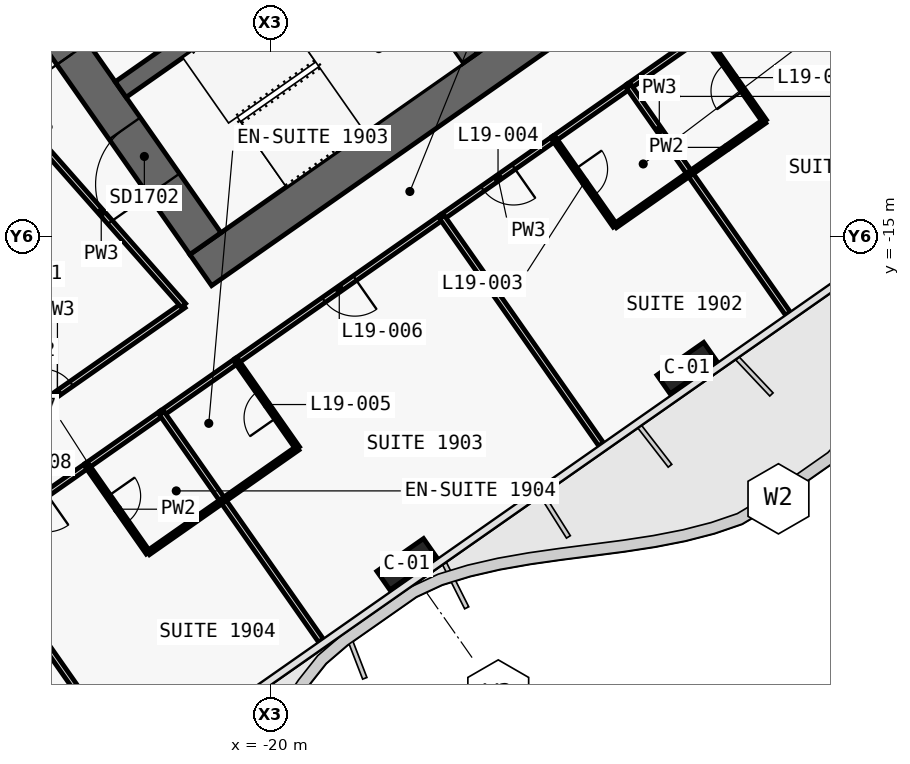
"""IFC4 building model, lengths in metres.
Left out: names, types, materials, properties, quantities, classifications, styles, units other than length and angle.
Written with IfcOpenShell. Run it as: python <this file> out.ifc"""

import sys

from ifc_helpers import new_model, si_unit, direction, frame, frame_2d, origin, origin_2d, place, context, subcontext, project, spatial, polyline, rectangle, outline, extrude, element, fill, save


model = new_model("IFC4")
c1 = context("Model", 3, precision=1e-05, world=origin(), true_north=direction((0.0, 1.0)))
c2 = subcontext(c1, "Body", "Model", "MODEL_VIEW")
j1 = project(units=[si_unit("LENGTHUNIT", "METRE"), si_unit("PLANEANGLEUNIT", "RADIAN")], contexts=[c1])
p1 = place(None, origin())
s1 = spatial("IfcSite", under=j1, at=p1, CompositionType="ELEMENT")
p2 = place(p1, origin())
s2 = spatial("IfcBuilding", under=s1, at=p2, CompositionType="ELEMENT")
p3 = place(p2, frame((0.0, 0.0, 94.1)))
s3 = spatial("IfcBuildingStorey", under=s2, at=p3, CompositionType="ELEMENT", Elevation=94.1)
p4 = place(p3, frame((0.037, -0.585, 0.0), z_axis=(0.0, 0.0, 1.0), x_axis=(-0.819157152511, -0.573569140985, 0.0)))
e1 = element("IfcWall", 1, at=p4, inside=s3, PredefinedType="SHEAR", context=c2, shape_type="SweptSolid", body=[
    extrude(outline(polyline([(26.695, 0.5), (0.7, 0.5), (0.0, -0.5), (26.695, -0.5), (26.695, 0.5)])), origin(), (0.0, 0.0, 1.0), 3.6),
])
p5 = place(p4, frame((2.995, 0.0, 0.0)))
e2 = element("IfcOpeningElement", 2, at=p5, cuts=e1, PredefinedType="OPENING", context=c2, shape_type="SweptSolid", body=[
    extrude(rectangle(XDim=2.4, YDim=2.1, at=frame_2d((1.2, 1.05))), frame((0.0, 0.51, 0.0), z_axis=(0.0, -1.0, 0.0), x_axis=(1.0, 0.0, 0.0)), (0.0, 0.0, 1.0), 1.02),
])
p6 = place(p4, frame((11.995, 0.0, 0.0)))
e3 = element("IfcOpeningElement", 3, at=p6, cuts=e1, PredefinedType="OPENING", context=c2, shape_type="SweptSolid", body=[
    extrude(rectangle(XDim=2.4, YDim=2.1, at=frame_2d((1.2, 1.05))), frame((0.0, 0.51, 0.0), z_axis=(0.0, -1.0, 0.0), x_axis=(1.0, 0.0, 0.0)), (0.0, 0.0, 1.0), 1.02),
])
p7 = place(p3, frame((-21.708, -15.2, 0.0), z_axis=(0.0, 0.0, 1.0), x_axis=(-0.573576324356, 0.819152122709, 0.0)))
e4 = element("IfcWall", 4, at=p7, inside=s3, PredefinedType="SHEAR", context=c2, shape_type="SweptSolid", body=[
    extrude(outline(polyline([(0.0, 0.5), (0.0, -0.5), (9.2, -0.5), (9.2, 0.5), (0.0, 0.5)])), origin(), (0.0, 0.0, 1.0), 3.6),
])
p8 = place(p7, frame((6.1, 0.0, 0.0)))
e5 = element("IfcOpeningElement", 5, at=p8, cuts=e4, PredefinedType="OPENING", context=c2, shape_type="SweptSolid", body=[
    extrude(rectangle(XDim=1.8, YDim=2.1, at=frame_2d((0.9, 1.05))), frame((0.0, 0.51, 0.0), z_axis=(0.0, -1.0, 0.0), x_axis=(1.0, 0.0, 0.0)), (0.0, 0.0, 1.0), 1.02),
])
p9 = place(p7, frame((1.9, 0.0, 0.0)))
e6 = element("IfcOpeningElement", 6, at=p9, cuts=e4, PredefinedType="OPENING", context=c2, shape_type="SweptSolid", body=[
    extrude(rectangle(XDim=1.8, YDim=2.1, at=frame_2d((0.9, 1.05))), frame((0.0, 0.51, 0.0), z_axis=(0.0, -1.0, 0.0), x_axis=(1.0, 0.0, 0.0)), (0.0, 0.0, 1.0), 1.02),
])
p10 = place(p3, frame((-14.745, -10.324, 0.0), z_axis=(0.0, 0.0, 1.0), x_axis=(-0.57356780395, 0.819158088694, 0.0)))
e7 = element("IfcWall", 7, at=p10, inside=s3, PredefinedType="SHEAR", context=c2, shape_type="SweptSolid", body=[
    extrude(outline(polyline([(4.35, 0.25), (0.0, 0.25), (0.0, -0.25), (4.35, -0.25), (4.35, 0.25)])), origin(), (0.0, 0.0, 1.0), 3.6),
])
p11 = place(p3, frame((-2.638, 3.768, 0.0), z_axis=(0.0, 0.0, 1.0), x_axis=(-0.819148977158, -0.573580816643, 0.0)))
e8 = element("IfcWall", 8, at=p11, inside=s3, PredefinedType="SHEAR", context=c2, shape_type="SweptSolid", body=[
    extrude(outline(polyline([(26.0, 0.25), (0.0, 0.25), (0.0, -0.25), (26.0, -0.25), (26.0, 0.25)])), origin(), (0.0, 0.0, 1.0), 3.6),
])
p12 = place(p11, frame((1.169, 0.0, 0.0)))
e9 = element("IfcOpeningElement", 9, at=p12, cuts=e8, PredefinedType="OPENING", context=c2, shape_type="SweptSolid", body=[
    extrude(rectangle(XDim=1.1, YDim=2.1, at=frame_2d((0.55, 1.05))), frame((0.0, 0.26, 0.0), z_axis=(0.0, -1.0, 0.0), x_axis=(1.0, 0.0, 0.0)), (0.0, 0.0, 1.0), 0.52),
])
p13 = place(p11, frame((3.206, 0.0, 0.0)))
e10 = element("IfcOpeningElement", 10, at=p13, cuts=e8, PredefinedType="OPENING", context=c2, shape_type="SweptSolid", body=[
    extrude(rectangle(XDim=1.1, YDim=2.1, at=frame_2d((0.55, 1.05))), frame((0.0, 0.26, 0.0), z_axis=(0.0, -1.0, 0.0), x_axis=(1.0, 0.0, 0.0)), (0.0, 0.0, 1.0), 0.52),
])
p14 = place(p11, frame((5.244, 0.0, 0.0)))
e11 = element("IfcOpeningElement", 11, at=p14, cuts=e8, PredefinedType="OPENING", context=c2, shape_type="SweptSolid", body=[
    extrude(rectangle(XDim=1.1, YDim=2.1, at=frame_2d((0.55, 1.05))), frame((0.0, 0.26, 0.0), z_axis=(0.0, -1.0, 0.0), x_axis=(1.0, 0.0, 0.0)), (0.0, 0.0, 1.0), 0.52),
])
p15 = place(p11, frame((7.281, 0.0, 0.0)))
e12 = element("IfcOpeningElement", 12, at=p15, cuts=e8, PredefinedType="OPENING", context=c2, shape_type="SweptSolid", body=[
    extrude(rectangle(XDim=1.1, YDim=2.1, at=frame_2d((0.55, 1.05))), frame((0.0, 0.26, 0.0), z_axis=(0.0, -1.0, 0.0), x_axis=(1.0, 0.0, 0.0)), (0.0, 0.0, 1.0), 0.52),
])
p16 = place(p11, frame((9.688, 0.0, 0.0)))
e13 = element("IfcOpeningElement", 13, at=p16, cuts=e8, PredefinedType="OPENING", context=c2, shape_type="SweptSolid", body=[
    extrude(rectangle(XDim=1.1, YDim=2.1, at=frame_2d((0.55, 1.05))), frame((0.0, 0.26, 0.0), z_axis=(0.0, -1.0, 0.0), x_axis=(1.0, 0.0, 0.0)), (0.0, 0.0, 1.0), 0.52),
])
p17 = place(p11, frame((11.863, 0.0, 0.0)))
e14 = element("IfcOpeningElement", 14, at=p17, cuts=e8, PredefinedType="OPENING", context=c2, shape_type="SweptSolid", body=[
    extrude(rectangle(XDim=1.1, YDim=2.1, at=frame_2d((0.55, 1.05))), frame((0.0, 0.26, 0.0), z_axis=(0.0, -1.0, 0.0), x_axis=(1.0, 0.0, 0.0)), (0.0, 0.0, 1.0), 0.52),
])
p18 = place(p11, frame((14.038, 0.0, 0.0)))
e15 = element("IfcOpeningElement", 15, at=p18, cuts=e8, PredefinedType="OPENING", context=c2, shape_type="SweptSolid", body=[
    extrude(rectangle(XDim=1.1, YDim=2.1, at=frame_2d((0.55, 1.05))), frame((0.0, 0.26, 0.0), z_axis=(0.0, -1.0, 0.0), x_axis=(1.0, 0.0, 0.0)), (0.0, 0.0, 1.0), 0.52),
])
p19 = place(p11, frame((16.212, 0.0, 0.0)))
e16 = element("IfcOpeningElement", 16, at=p19, cuts=e8, PredefinedType="OPENING", context=c2, shape_type="SweptSolid", body=[
    extrude(rectangle(XDim=1.1, YDim=2.1, at=frame_2d((0.55, 1.05))), frame((0.0, 0.26, 0.0), z_axis=(0.0, -1.0, 0.0), x_axis=(1.0, 0.0, 0.0)), (0.0, 0.0, 1.0), 0.52),
])
for number, where, z_axis, x_axis in (
    (17, (-9.038, -18.475, 0.0), (0.0, 0.0, 1.0), (-0.819, -0.574, 0.0)),
    (18, (-16.41, -23.637, 0.0), (0.0, 0.0, 1.0), (-0.819, -0.574, 0.0)),
):
    element("IfcColumn", number, at=place(p3, frame(where, z_axis=z_axis, x_axis=x_axis)), inside=s3, PredefinedType="COLUMN", context=c2, shape_type="SweptSolid", body=[
        extrude(rectangle(XDim=1.5, YDim=0.6, at=origin_2d()), origin(), (0.0, 0.0, 1.0), 3.6),
    ])
p20 = place(p3, frame((-28.917, -21.469, 0.0), z_axis=(0.0, 0.0, 1.0), x_axis=(0.819152599934, 0.573575642807, 0.0)))
e19 = element("IfcWall", 19, at=p20, inside=s3, PredefinedType="PARTITIONING", context=c2, shape_type="SweptSolid", body=[
    extrude(rectangle(XDim=8.098, YDim=0.15, at=frame_2d((4.049, 0.0))), origin(), (0.0, 0.0, 1.0), 2.6),
])
p21 = place(p20, frame((3.599, 0.0, 0.0)))
e20 = element("IfcOpeningElement", 20, at=p21, cuts=e19, PredefinedType="OPENING", context=c2, shape_type="SweptSolid", body=[
    extrude(rectangle(XDim=0.9, YDim=2.1, at=frame_2d((0.45, 1.05))), frame((0.0, 0.085, 0.0), z_axis=(0.0, -1.0, 0.0), x_axis=(1.0, 0.0, 0.0)), (0.0, 0.0, 1.0), 0.17),
])
p22 = place(p3, frame((-8.599, -9.683, 0.0), z_axis=(0.0, 0.0, 1.0), x_axis=(-0.819146032251, -0.573585022335, 0.0)))
e21 = element("IfcWall", 21, at=p22, inside=s3, PredefinedType="PARTITIONING", context=c2, shape_type="SweptSolid", body=[
    extrude(rectangle(XDim=2.404, YDim=0.15, at=frame_2d((1.202, 0.0))), origin(), (0.0, 0.0, 1.0), 3.32),
])
p23 = place(p3, frame((-12.532, -12.437, 0.0), z_axis=(0.0, 0.0, 1.0), x_axis=(-0.819145961204, -0.573585123798, 0.0)))
e22 = element("IfcWall", 22, at=p23, inside=s3, PredefinedType="PARTITIONING", context=c2, shape_type="SweptSolid", body=[
    extrude(rectangle(XDim=3.603, YDim=0.15, at=frame_2d((1.802, 0.0))), origin(), (0.0, 0.0, 1.0), 2.6),
])
p24 = place(p23, frame((1.301, 0.0, 0.0)))
e23 = element("IfcOpeningElement", 23, at=p24, cuts=e22, PredefinedType="OPENING", context=c2, shape_type="SweptSolid", body=[
    extrude(rectangle(XDim=1.0, YDim=2.1, at=frame_2d((0.5, 1.05))), frame((0.0, 0.085, 0.0), z_axis=(0.0, -1.0, 0.0), x_axis=(1.0, 0.0, 0.0)), (0.0, 0.0, 1.0), 0.17),
])
p25 = place(p3, frame((-10.565, -11.06, 0.0), z_axis=(0.0, 0.0, 1.0), x_axis=(-0.819193748, -0.57351687267, 0.0)))
e24 = element("IfcWall", 24, at=p25, inside=s3, PredefinedType="PARTITIONING", context=c2, shape_type="SweptSolid", body=[
    extrude(rectangle(XDim=2.404, YDim=0.15, at=frame_2d((1.202, 0.0))), origin(), (0.0, 0.0, 1.0), 3.32),
])
p26 = place(p3, frame((-15.48, -14.501, 0.0), z_axis=(0.0, 0.0, 1.0), x_axis=(-0.819153746897, -0.573574004767, 0.0)))
e25 = element("IfcWall", 25, at=p26, inside=s3, PredefinedType="PARTITIONING", context=c2, shape_type="SweptSolid", body=[
    extrude(rectangle(XDim=6.603, YDim=0.15, at=frame_2d((3.302, 0.0))), origin(), (0.0, 0.0, 1.0), 2.6),
])
p27 = place(p26, frame((2.802, 0.0, 0.0)))
e26 = element("IfcOpeningElement", 26, at=p27, cuts=e25, PredefinedType="OPENING", context=c2, shape_type="SweptSolid", body=[
    extrude(rectangle(XDim=1.0, YDim=2.1, at=frame_2d((0.5, 1.05))), frame((0.0, 0.085, 0.0), z_axis=(0.0, -1.0, 0.0), x_axis=(1.0, 0.0, 0.0)), (0.0, 0.0, 1.0), 0.17),
])
p28 = place(p3, frame((-20.886, -18.287, 0.0), z_axis=(0.0, 0.0, 1.0), x_axis=(-0.819146032251, -0.573585022335, 0.0)))
e27 = element("IfcWall", 27, at=p28, inside=s3, PredefinedType="PARTITIONING", context=c2, shape_type="SweptSolid", body=[
    extrude(rectangle(XDim=2.404, YDim=0.15, at=frame_2d((1.202, 0.0))), origin(), (0.0, 0.0, 1.0), 3.32),
])
p29 = place(p3, frame((-24.819, -21.041, 0.0), z_axis=(0.0, 0.0, 1.0), x_axis=(-0.819145961204, -0.573585123798, 0.0)))
e28 = element("IfcWall", 28, at=p29, inside=s3, PredefinedType="PARTITIONING", context=c2, shape_type="SweptSolid", body=[
    extrude(rectangle(XDim=3.603, YDim=0.15, at=frame_2d((1.802, 0.0))), origin(), (0.0, 0.0, 1.0), 2.6),
])
p30 = place(p29, frame((1.301, 0.0, 0.0)))
e29 = element("IfcOpeningElement", 29, at=p30, cuts=e28, PredefinedType="OPENING", context=c2, shape_type="SweptSolid", body=[
    extrude(rectangle(XDim=1.0, YDim=2.1, at=frame_2d((0.5, 1.05))), frame((0.0, 0.085, 0.0), z_axis=(0.0, -1.0, 0.0), x_axis=(1.0, 0.0, 0.0)), (0.0, 0.0, 1.0), 0.17),
])
p31 = place(p3, frame((-22.852, -19.664, 0.0), z_axis=(0.0, 0.0, 1.0), x_axis=(-0.81911261637, -0.573632741136, 0.0)))
e30 = element("IfcWall", 30, at=p31, inside=s3, PredefinedType="PARTITIONING", context=c2, shape_type="SweptSolid", body=[
    extrude(rectangle(XDim=2.404, YDim=0.15, at=frame_2d((1.202, 0.0))), origin(), (0.0, 0.0, 1.0), 3.32),
])
p32 = place(p3, frame((-1.849, -13.051, 0.0), z_axis=(0.0, 0.0, 1.0), x_axis=(-0.573575988258, 0.819152358047, 0.0)))
e31 = element("IfcWall", 31, at=p32, inside=s3, PredefinedType="PARTITIONING", context=c2, shape_type="SweptSolid", body=[
    extrude(rectangle(XDim=6.632, YDim=0.15, at=frame_2d((3.316, 0.0))), origin(), (0.0, 0.0, 1.0), 2.6),
])
p33 = place(p3, frame((-22.284, -16.827, 0.0), z_axis=(0.0, 0.0, 1.0), x_axis=(-0.661545117561, 0.749905365651, 0.0)))
e32 = element("IfcWall", 32, at=p33, inside=s3, PredefinedType="PARTITIONING", context=c2, shape_type="SweptSolid", body=[
    extrude(rectangle(XDim=6.543, YDim=0.15, at=frame_2d((3.271, 0.0))), origin(), (0.0, 0.0, 1.0), 2.6),
])
p34 = place(p3, frame((-8.96, -13.355, 0.0), z_axis=(0.0, 0.0, 1.0), x_axis=(0.819188907105, 0.573523787192, 0.0)))
e33 = element("IfcWall", 33, at=p34, inside=s3, PredefinedType="PARTITIONING", context=c2, shape_type="SweptSolid", body=[
    extrude(rectangle(XDim=2.4, YDim=0.12, at=frame_2d((1.2, 0.0))), origin(), (0.0, 0.0, 1.0), 3.32),
])
p35 = place(p3, frame((-6.994, -11.978, 0.0), z_axis=(0.0, 0.0, 1.0), x_axis=(-0.573550118428, 0.819170471667, 0.0)))
e34 = element("IfcWall", 34, at=p35, inside=s3, PredefinedType="PARTITIONING", context=c2, shape_type="SweptSolid", body=[
    extrude(rectangle(XDim=2.8, YDim=0.12, at=frame_2d((1.4, 0.0))), origin(), (0.0, 0.0, 1.0), 3.32),
])
p36 = place(p35, frame((0.975, 0.0, 0.0)))
e35 = element("IfcOpeningElement", 35, at=p36, cuts=e34, PredefinedType="OPENING", context=c2, shape_type="SweptSolid", body=[
    extrude(rectangle(XDim=0.85, YDim=2.05, at=frame_2d((0.425, 1.025))), frame((0.0, 0.07, 0.0), z_axis=(0.0, -1.0, 0.0), x_axis=(1.0, 0.0, 0.0)), (0.0, 0.0, 1.0), 0.14),
])
p37 = place(p3, frame((-6.379, -17.041, 0.0), z_axis=(0.0, 0.0, 1.0), x_axis=(-0.573564311442, 0.819160534108, 0.0)))
e36 = element("IfcWall", 36, at=p37, inside=s3, PredefinedType="PARTITIONING", context=c2, shape_type="SweptSolid", body=[
    extrude(rectangle(XDim=4.499, YDim=0.15, at=frame_2d((2.25, 0.0))), origin(), (0.0, 0.0, 1.0), 2.5),
])
p38 = place(p3, frame((-8.96, -13.355, 0.0), z_axis=(0.0, 0.0, 1.0), x_axis=(-0.573608623498, 0.819129505664, 0.0)))
e37 = element("IfcWall", 37, at=p38, inside=s3, PredefinedType="PARTITIONING", context=c2, shape_type="SweptSolid", body=[
    extrude(rectangle(XDim=2.8, YDim=0.15, at=frame_2d((1.4, 0.0))), origin(), (0.0, 0.0, 1.0), 3.32),
])
p39 = place(p3, frame((-12.533, -12.438, 0.0), z_axis=(0.0, 0.0, 1.0), x_axis=(0.573550118428, -0.819170471667, 0.0)))
e38 = element("IfcWall", 38, at=p39, inside=s3, PredefinedType="PARTITIONING", context=c2, shape_type="SweptSolid", body=[
    extrude(rectangle(XDim=2.8, YDim=0.12, at=frame_2d((1.4, 0.0))), origin(), (0.0, 0.0, 1.0), 3.32),
])
p40 = place(p39, frame((0.975, 0.0, 0.0)))
e39 = element("IfcOpeningElement", 39, at=p40, cuts=e38, PredefinedType="OPENING", context=c2, shape_type="SweptSolid", body=[
    extrude(rectangle(XDim=0.85, YDim=2.05, at=frame_2d((0.425, 1.025))), frame((0.0, 0.07, 0.0), z_axis=(0.0, -1.0, 0.0), x_axis=(1.0, 0.0, 0.0)), (0.0, 0.0, 1.0), 0.14),
])
p41 = place(p3, frame((-10.926, -14.732, 0.0), z_axis=(0.0, 0.0, 1.0), x_axis=(0.819107643868, 0.573639841501, 0.0)))
e40 = element("IfcWall", 40, at=p41, inside=s3, PredefinedType="PARTITIONING", context=c2, shape_type="SweptSolid", body=[
    extrude(rectangle(XDim=2.4, YDim=0.12, at=frame_2d((1.2, 0.0))), origin(), (0.0, 0.0, 1.0), 3.32),
])
p42 = place(p3, frame((-11.294, -20.482, 0.0), z_axis=(0.0, 0.0, 1.0), x_axis=(-0.573572324301, 0.819154923562, 0.0)))
e41 = element("IfcWall", 41, at=p42, inside=s3, PredefinedType="PARTITIONING", context=c2, shape_type="SweptSolid", body=[
    extrude(rectangle(XDim=7.3, YDim=0.15, at=frame_2d((3.65, 0.0))), origin(), (0.0, 0.0, 1.0), 2.5),
])
p43 = place(p3, frame((-21.247, -21.959, 0.0), z_axis=(0.0, 0.0, 1.0), x_axis=(0.819141114317, 0.573592045652, 0.0)))
e42 = element("IfcWall", 42, at=p43, inside=s3, PredefinedType="PARTITIONING", context=c2, shape_type="SweptSolid", body=[
    extrude(rectangle(XDim=2.4, YDim=0.12, at=frame_2d((1.2, 0.0))), origin(), (0.0, 0.0, 1.0), 3.32),
])
p44 = place(p3, frame((-19.281, -20.581, 0.0), z_axis=(0.0, 0.0, 1.0), x_axis=(-0.573550118428, 0.819170471667, 0.0)))
e43 = element("IfcWall", 43, at=p44, inside=s3, PredefinedType="PARTITIONING", context=c2, shape_type="SweptSolid", body=[
    extrude(rectangle(XDim=2.8, YDim=0.12, at=frame_2d((1.4, 0.0))), origin(), (0.0, 0.0, 1.0), 3.32),
])
p45 = place(p44, frame((0.975, 0.0, 0.0)))
e44 = element("IfcOpeningElement", 44, at=p45, cuts=e43, PredefinedType="OPENING", context=c2, shape_type="SweptSolid", body=[
    extrude(rectangle(XDim=0.85, YDim=2.05, at=frame_2d((0.425, 1.025))), frame((0.0, 0.07, 0.0), z_axis=(0.0, -1.0, 0.0), x_axis=(1.0, 0.0, 0.0)), (0.0, 0.0, 1.0), 0.14),
])
p46 = place(p3, frame((-18.667, -25.645, 0.0), z_axis=(0.0, 0.0, 1.0), x_axis=(-0.573589807488, 0.819142681555, 0.0)))
e45 = element("IfcWall", 45, at=p46, inside=s3, PredefinedType="PARTITIONING", context=c2, shape_type="SweptSolid", body=[
    extrude(rectangle(XDim=4.499, YDim=0.15, at=frame_2d((2.25, 0.0))), origin(), (0.0, 0.0, 1.0), 2.5),
])
p47 = place(p3, frame((-21.248, -21.958, 0.0), z_axis=(0.0, 0.0, 1.0), x_axis=(-0.573550118428, 0.819170471667, 0.0)))
e46 = element("IfcWall", 46, at=p47, inside=s3, PredefinedType="PARTITIONING", context=c2, shape_type="SweptSolid", body=[
    extrude(rectangle(XDim=2.8, YDim=0.15, at=frame_2d((1.4, 0.0))), origin(), (0.0, 0.0, 1.0), 3.32),
])
p48 = place(p3, frame((-24.821, -21.042, 0.0), z_axis=(0.0, 0.0, 1.0), x_axis=(0.573591086599, -0.819141785879, 0.0)))
e47 = element("IfcWall", 47, at=p48, inside=s3, PredefinedType="PARTITIONING", context=c2, shape_type="SweptSolid", body=[
    extrude(rectangle(XDim=2.8, YDim=0.12, at=frame_2d((1.4, 0.0))), origin(), (0.0, 0.0, 1.0), 3.32),
])
p49 = place(p48, frame((0.975, 0.0, 0.0)))
e48 = element("IfcOpeningElement", 48, at=p49, cuts=e47, PredefinedType="OPENING", context=c2, shape_type="SweptSolid", body=[
    extrude(rectangle(XDim=0.85, YDim=2.05, at=frame_2d((0.425, 1.025))), frame((0.0, 0.07, 0.0), z_axis=(0.0, -1.0, 0.0), x_axis=(1.0, 0.0, 0.0)), (0.0, 0.0, 1.0), 0.14),
])
p50 = place(p3, frame((-23.213, -23.336, 0.0), z_axis=(0.0, 0.0, 1.0), x_axis=(0.819155442668, 0.573571582932, 0.0)))
e49 = element("IfcWall", 49, at=p50, inside=s3, PredefinedType="PARTITIONING", context=c2, shape_type="SweptSolid", body=[
    extrude(rectangle(XDim=2.4, YDim=0.12, at=frame_2d((1.2, 0.0))), origin(), (0.0, 0.0, 1.0), 3.32),
])
p51 = place(p3, frame((-23.966, -28.537, 0.0), z_axis=(0.0, 0.0, 1.0), x_axis=(-0.57359826181, 0.819136761505, 0.0)))
e50 = element("IfcWall", 50, at=p51, inside=s3, PredefinedType="PARTITIONING", context=c2, shape_type="SweptSolid", body=[
    extrude(rectangle(XDim=6.63, YDim=0.15, at=frame_2d((3.315, 0.0))), origin(), (0.0, 0.0, 1.0), 2.6),
])
p52 = place(p8, origin())
e51 = element("IfcDoor", 51, at=p52, inside=s3, OperationType="DOUBLE_DOOR_SINGLE_SWING", PredefinedType="DOOR", context=c2, shape_type="SweptSolid", body=[
    extrude(rectangle(XDim=1.8, YDim=2.1, at=frame_2d((0.9, 1.05))), frame((0.0, 0.025, 0.0), z_axis=(0.0, -1.0, 0.0), x_axis=(1.0, 0.0, 0.0)), (0.0, 0.0, 1.0), 0.05),
])
fill(e5, e51)
p53 = place(p9, origin())
e52 = element("IfcDoor", 52, at=p53, inside=s3, OperationType="DOUBLE_DOOR_SINGLE_SWING", PredefinedType="DOOR", context=c2, shape_type="SweptSolid", body=[
    extrude(rectangle(XDim=1.8, YDim=2.1, at=frame_2d((0.9, 1.05))), frame((0.0, 0.025, 0.0), z_axis=(0.0, -1.0, 0.0), x_axis=(1.0, 0.0, 0.0)), (0.0, 0.0, 1.0), 0.05),
])
fill(e6, e52)
p54 = place(p36, origin())
e53 = element("IfcDoor", 53, at=p54, inside=s3, OperationType="SINGLE_SWING_LEFT", PredefinedType="DOOR", context=c2, shape_type="SweptSolid", body=[
    extrude(rectangle(XDim=0.85, YDim=2.05, at=frame_2d((0.425, 1.025))), frame((0.0, 0.025, 0.0), z_axis=(0.0, -1.0, 0.0), x_axis=(1.0, 0.0, 0.0)), (0.0, 0.0, 1.0), 0.05),
])
fill(e35, e53)
p55 = place(p40, origin())
e54 = element("IfcDoor", 54, at=p55, inside=s3, OperationType="SINGLE_SWING_LEFT", PredefinedType="DOOR", context=c2, shape_type="SweptSolid", body=[
    extrude(rectangle(XDim=0.85, YDim=2.05, at=frame_2d((0.425, 1.025))), frame((0.0, 0.025, 0.0), z_axis=(0.0, -1.0, 0.0), x_axis=(1.0, 0.0, 0.0)), (0.0, 0.0, 1.0), 0.05),
])
fill(e39, e54)
p56 = place(p24, origin())
e55 = element("IfcDoor", 55, at=p56, inside=s3, OperationType="SINGLE_SWING_RIGHT", PredefinedType="DOOR", context=c2, shape_type="SweptSolid", body=[
    extrude(rectangle(XDim=1.0, YDim=2.1, at=frame_2d((0.5, 1.05))), frame((0.0, 0.025, 0.0), z_axis=(0.0, -1.0, 0.0), x_axis=(1.0, 0.0, 0.0)), (0.0, 0.0, 1.0), 0.05),
])
fill(e23, e55)
p57 = place(p45, origin())
e56 = element("IfcDoor", 56, at=p57, inside=s3, OperationType="SINGLE_SWING_LEFT", PredefinedType="DOOR", context=c2, shape_type="SweptSolid", body=[
    extrude(rectangle(XDim=0.85, YDim=2.05, at=frame_2d((0.425, 1.025))), frame((0.0, 0.025, 0.0), z_axis=(0.0, -1.0, 0.0), x_axis=(1.0, 0.0, 0.0)), (0.0, 0.0, 1.0), 0.05),
])
fill(e44, e56)
p58 = place(p27, origin())
e57 = element("IfcDoor", 57, at=p58, inside=s3, OperationType="SINGLE_SWING_LEFT", PredefinedType="DOOR", context=c2, shape_type="SweptSolid", body=[
    extrude(rectangle(XDim=1.0, YDim=2.1, at=frame_2d((0.5, 1.05))), frame((0.0, 0.025, 0.0), z_axis=(0.0, -1.0, 0.0), x_axis=(1.0, 0.0, 0.0)), (0.0, 0.0, 1.0), 0.05),
])
fill(e26, e57)
p59 = place(p49, origin())
e58 = element("IfcDoor", 58, at=p59, inside=s3, OperationType="SINGLE_SWING_LEFT", PredefinedType="DOOR", context=c2, shape_type="SweptSolid", body=[
    extrude(rectangle(XDim=0.85, YDim=2.05, at=frame_2d((0.425, 1.025))), frame((0.0, 0.025, 0.0), z_axis=(0.0, -1.0, 0.0), x_axis=(1.0, 0.0, 0.0)), (0.0, 0.0, 1.0), 0.05),
])
fill(e48, e58)
p60 = place(p21, origin())
e59 = element("IfcDoor", 59, at=p60, inside=s3, OperationType="SINGLE_SWING_RIGHT", PredefinedType="DOOR", context=c2, shape_type="SweptSolid", body=[
    extrude(rectangle(XDim=0.9, YDim=2.1, at=frame_2d((0.45, 1.05))), frame((0.0, 0.025, 0.0), z_axis=(0.0, -1.0, 0.0), x_axis=(1.0, 0.0, 0.0)), (0.0, 0.0, 1.0), 0.05),
])
fill(e20, e59)
save(model, sys.argv[1])
